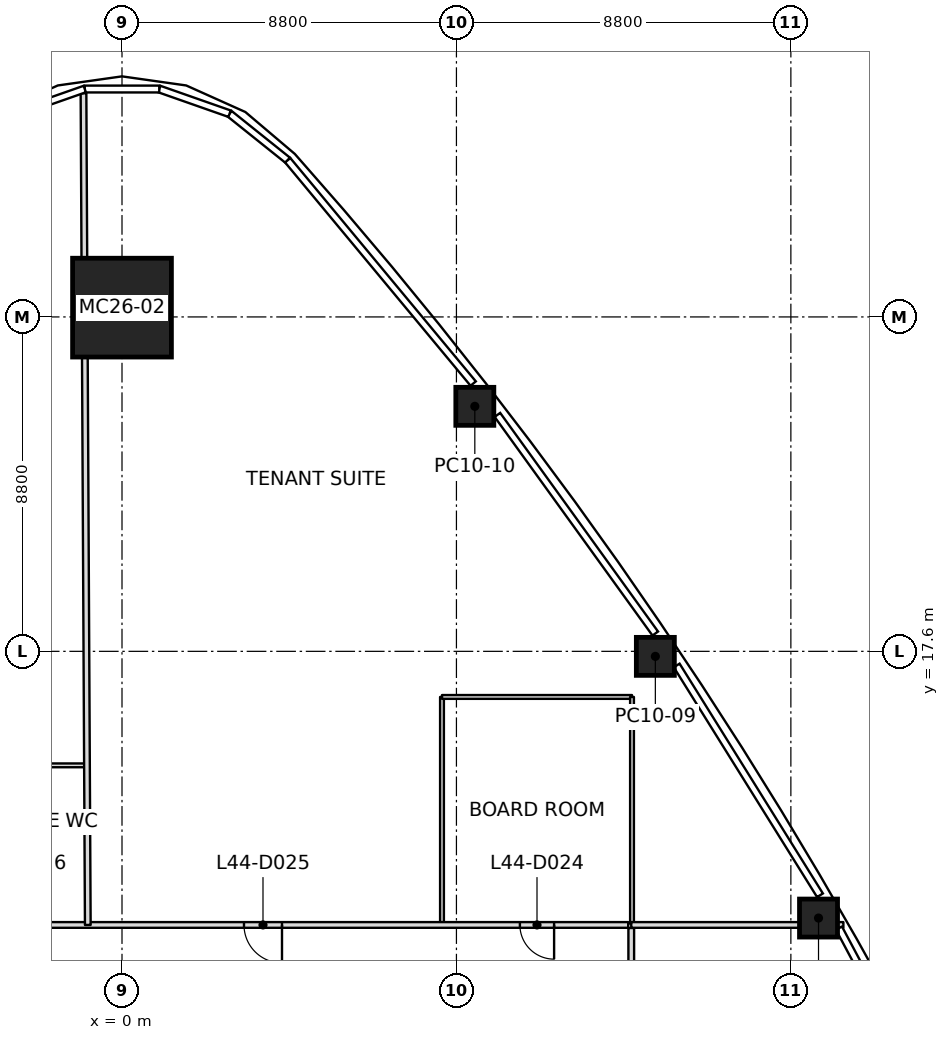
"""IFC4 building model, lengths in metres.
Left out: names, types, materials, properties, quantities, classifications, styles, units other than length and angle.
Written with IfcOpenShell. Run it as: python <this file> out.ifc"""

import sys

from ifc_helpers import new_model, si_unit, direction, frame, frame_2d, origin, origin_2d, place, context, subcontext, project, spatial, rectangle, extrude, element, fill, save


model = new_model("IFC4")
c1 = context("Model", 3, precision=1e-05, world=origin(), true_north=direction((0.0, 1.0)))
c2 = subcontext(c1, "Body", "Model", "MODEL_VIEW")
j1 = project(units=[si_unit("LENGTHUNIT", "METRE"), si_unit("PLANEANGLEUNIT", "RADIAN")], contexts=[c1])
p1 = place(None, origin())
s1 = spatial("IfcSite", under=j1, at=p1, CompositionType="ELEMENT")
p2 = place(p1, origin())
s2 = spatial("IfcBuilding", under=s1, at=p2, CompositionType="ELEMENT")
p3 = place(p2, frame((0.0, 0.0, 197.8)))
s3 = spatial("IfcBuildingStorey", under=s2, at=p3, CompositionType="ELEMENT", Elevation=197.8)
p4 = place(p3, frame((0.0, 26.645, 0.0), z_axis=(0.0, -0.032331720729, 0.999477193254), x_axis=(1.0, 0.0, 0.0)))
e1 = element("IfcColumn", 1, at=p4, inside=s3, PredefinedType="COLUMN", context=c2, shape_type="SweptSolid", body=[
    extrude(rectangle(XDim=2.6, YDim=2.6, at=origin_2d()), origin(), (0.0, 0.0, 1.0), 4.002),
])
p5 = place(p3, frame((18.328, 10.581, 0.0), z_axis=(-0.009887052741, -0.005675900648, 0.999935013058), x_axis=(-0.49997556095, 0.866039512773, -2.7732311e-05)))
e2 = element("IfcColumn", 2, at=p5, inside=s3, PredefinedType="COLUMN", context=c2, shape_type="SweptSolid", body=[
    extrude(rectangle(XDim=1.0, YDim=1.0, at=origin_2d()), origin(), (0.0, 0.0, 1.0), 4.0),
])
p6 = place(p3, frame((14.034, 17.468, 0.0), z_axis=(-0.005248490815, -0.013243284963, 0.999898529226), x_axis=(-0.557514318563, 0.830128114569, 0.008068333097)))
e3 = element("IfcColumn", 3, at=p6, inside=s3, PredefinedType="COLUMN", context=c2, shape_type="SweptSolid", body=[
    extrude(rectangle(XDim=1.0, YDim=1.0, at=origin_2d()), origin(), (0.0, 0.0, 1.0), 4.0),
])
p7 = place(p3, frame((9.284, 24.048, 0.0), z_axis=(-0.000183067202, -0.020442504242, 0.999791013416), x_axis=(-0.612482198011, 0.790321478111, 0.016047378453)))
e4 = element("IfcColumn", 4, at=p7, inside=s3, PredefinedType="COLUMN", context=c2, shape_type="SweptSolid", body=[
    extrude(rectangle(XDim=1.0, YDim=1.0, at=origin_2d()), origin(), (0.0, 0.0, 1.0), 4.001),
])
p8 = place(p3, frame((-0.9, 10.4, 0.0), z_axis=(0.0, 0.0, 1.0), x_axis=(-0.005175902557, 0.999986604927, 0.0)))
e5 = element("IfcWall", 5, at=p8, inside=s3, PredefinedType="PARTITIONING", context=c2, shape_type="SweptSolid", body=[
    extrude(rectangle(XDim=21.886, YDim=0.15, at=frame_2d((10.943, 0.0))), origin(), (0.0, 0.0, 1.0), 3.234),
])
p9 = place(p3, frame((13.4, 10.4, 0.0), z_axis=(0.0, 0.0, 1.0), x_axis=(1.0, 0.0, 0.0)))
e6 = element("IfcWall", 6, at=p9, inside=s3, PredefinedType="PARTITIONING", context=c2, shape_type="SweptSolid", body=[
    extrude(rectangle(XDim=5.582, YDim=0.15, at=frame_2d((2.791, 0.0))), origin(), (0.0, 0.0, 1.0), 3.45),
])
p10 = place(p3, frame((13.32, 10.4, 0.0), z_axis=(0.0, 0.0, 1.0), x_axis=(-1.0, 0.0, 0.0)))
e7 = element("IfcWall", 7, at=p10, inside=s3, PredefinedType="PARTITIONING", context=c2, shape_type="SweptSolid", body=[
    extrude(rectangle(XDim=26.64, YDim=0.15, at=frame_2d((13.32, 0.0))), origin(), (0.0, 0.0, 1.0), 3.166),
])
p11 = place(p10, frame((1.95, 0.0, 0.0)))
e8 = element("IfcOpeningElement", 8, at=p11, cuts=e7, PredefinedType="OPENING", context=c2, shape_type="SweptSolid", body=[
    extrude(rectangle(XDim=0.9, YDim=2.1, at=frame_2d((0.45, 1.05))), frame((0.0, 0.075, 0.0), z_axis=(0.0, -1.0, 0.0), x_axis=(1.0, 0.0, 0.0)), (0.0, 0.0, 1.0), 0.15),
])
p12 = place(p10, frame((9.11, 0.0, 0.0)))
e9 = element("IfcOpeningElement", 9, at=p12, cuts=e7, PredefinedType="OPENING", context=c2, shape_type="SweptSolid", body=[
    extrude(rectangle(XDim=1.0, YDim=2.1, at=frame_2d((0.5, 1.05))), frame((0.0, 0.075, 0.0), z_axis=(0.0, -1.0, 0.0), x_axis=(1.0, 0.0, 0.0)), (0.0, 0.0, 1.0), 0.15),
])
p13 = place(p10, frame((15.57, 0.0, 0.0)))
e10 = element("IfcOpeningElement", 10, at=p13, cuts=e7, PredefinedType="OPENING", context=c2, shape_type="SweptSolid", body=[
    extrude(rectangle(XDim=0.9, YDim=2.1, at=frame_2d((0.45, 1.05))), frame((0.0, 0.075, 0.0), z_axis=(0.0, -1.0, 0.0), x_axis=(1.0, 0.0, 0.0)), (0.0, 0.0, 1.0), 0.15),
])
p14 = place(p10, frame((21.83, 0.0, 0.0)))
e11 = element("IfcOpeningElement", 11, at=p14, cuts=e7, PredefinedType="OPENING", context=c2, shape_type="SweptSolid", body=[
    extrude(rectangle(XDim=1.0, YDim=2.1, at=frame_2d((0.5, 1.05))), frame((0.0, 0.075, 0.0), z_axis=(0.0, -1.0, 0.0), x_axis=(1.0, 0.0, 0.0)), (0.0, 0.0, 1.0), 0.15),
])
p15 = place(p3, frame((13.4, -10.32, 0.0), z_axis=(0.0, 0.0, 1.0), x_axis=(0.0, 1.0, 0.0)))
e12 = element("IfcWall", 12, at=p15, inside=s3, PredefinedType="PARTITIONING", context=c2, shape_type="SweptSolid", body=[
    extrude(rectangle(XDim=20.64, YDim=0.15, at=frame_2d((10.32, 0.0))), origin(), (0.0, 0.0, 1.0), 3.166),
])
p16 = place(p15, frame((15.47, 0.0, 0.0)))
e13 = element("IfcOpeningElement", 13, at=p16, cuts=e12, PredefinedType="OPENING", context=c2, shape_type="SweptSolid", body=[
    extrude(rectangle(XDim=1.0, YDim=2.1, at=frame_2d((0.5, 1.05))), frame((0.0, 0.075, 0.0), z_axis=(0.0, -1.0, 0.0), x_axis=(1.0, 0.0, 0.0)), (0.0, 0.0, 1.0), 0.15),
])
p17 = place(p15, frame((1.95, 0.0, 0.0)))
e14 = element("IfcOpeningElement", 14, at=p17, cuts=e12, PredefinedType="OPENING", context=c2, shape_type="SweptSolid", body=[
    extrude(rectangle(XDim=0.9, YDim=2.1, at=frame_2d((0.45, 1.05))), frame((0.0, 0.075, 0.0), z_axis=(0.0, -1.0, 0.0), x_axis=(1.0, 0.0, 0.0)), (0.0, 0.0, 1.0), 0.15),
])
p18 = place(p15, frame((7.61, 0.0, 0.0)))
e15 = element("IfcOpeningElement", 15, at=p18, cuts=e12, PredefinedType="OPENING", context=c2, shape_type="SweptSolid", body=[
    extrude(rectangle(XDim=1.0, YDim=2.1, at=frame_2d((0.5, 1.05))), frame((0.0, 0.075, 0.0), z_axis=(0.0, -1.0, 0.0), x_axis=(1.0, 0.0, 0.0)), (0.0, 0.0, 1.0), 0.15),
])
p19 = place(p3, frame((-4.5, 14.6, 0.0), z_axis=(0.0, 0.0, 1.0), x_axis=(1.0, 0.0, 0.0)))
e16 = element("IfcWall", 16, at=p19, inside=s3, PredefinedType="PARTITIONING", context=c2, shape_type="SweptSolid", body=[
    extrude(rectangle(XDim=3.57, YDim=0.1, at=frame_2d((1.785, 0.0))), origin(), (0.0, 0.0, 1.0), 3.317),
])
p20 = place(p3, frame((8.42, 10.43, 0.0), z_axis=(0.0, 0.0, 1.0), x_axis=(0.0, 1.0, 0.0)))
e17 = element("IfcWall", 17, at=p20, inside=s3, PredefinedType="PARTITIONING", context=c2, shape_type="SweptSolid", body=[
    extrude(rectangle(XDim=5.97, YDim=0.1, at=frame_2d((2.985, 0.0))), origin(), (0.0, 0.0, 1.0), 3.317),
])
p21 = place(p3, frame((8.42, 16.4, 0.0), z_axis=(0.0, 0.0, 1.0), x_axis=(1.0, 0.0, 0.0)))
e18 = element("IfcWall", 18, at=p21, inside=s3, PredefinedType="PARTITIONING", context=c2, shape_type="SweptSolid", body=[
    extrude(rectangle(XDim=5.0, YDim=0.1, at=frame_2d((2.5, 0.0))), origin(), (0.0, 0.0, 1.0), 3.45),
])
p22 = place(p3, frame((13.42, 16.4, 0.0), z_axis=(0.0, 0.0, 1.0), x_axis=(0.0, -1.0, 0.0)))
e19 = element("IfcWall", 19, at=p22, inside=s3, PredefinedType="PARTITIONING", context=c2, shape_type="SweptSolid", body=[
    extrude(rectangle(XDim=5.97, YDim=0.1, at=frame_2d((2.985, 0.0))), origin(), (0.0, 0.0, 1.0), 3.317),
])
p23 = place(p11, origin())
e20 = element("IfcDoor", 20, at=p23, inside=s3, OperationType="SINGLE_SWING_LEFT", PredefinedType="DOOR", context=c2, shape_type="SweptSolid", body=[
    extrude(rectangle(XDim=0.9, YDim=2.1, at=frame_2d((0.45, 1.05))), frame((0.0, 0.025, 0.0), z_axis=(0.0, -1.0, 0.0), x_axis=(1.0, 0.0, 0.0)), (0.0, 0.0, 1.0), 0.05),
])
fill(e8, e20)
p24 = place(p12, origin())
e21 = element("IfcDoor", 21, at=p24, inside=s3, OperationType="SINGLE_SWING_RIGHT", PredefinedType="DOOR", context=c2, shape_type="SweptSolid", body=[
    extrude(rectangle(XDim=1.0, YDim=2.1, at=frame_2d((0.5, 1.05))), frame((0.0, 0.025, 0.0), z_axis=(0.0, -1.0, 0.0), x_axis=(1.0, 0.0, 0.0)), (0.0, 0.0, 1.0), 0.05),
])
fill(e9, e21)
save(model, sys.argv[1])
